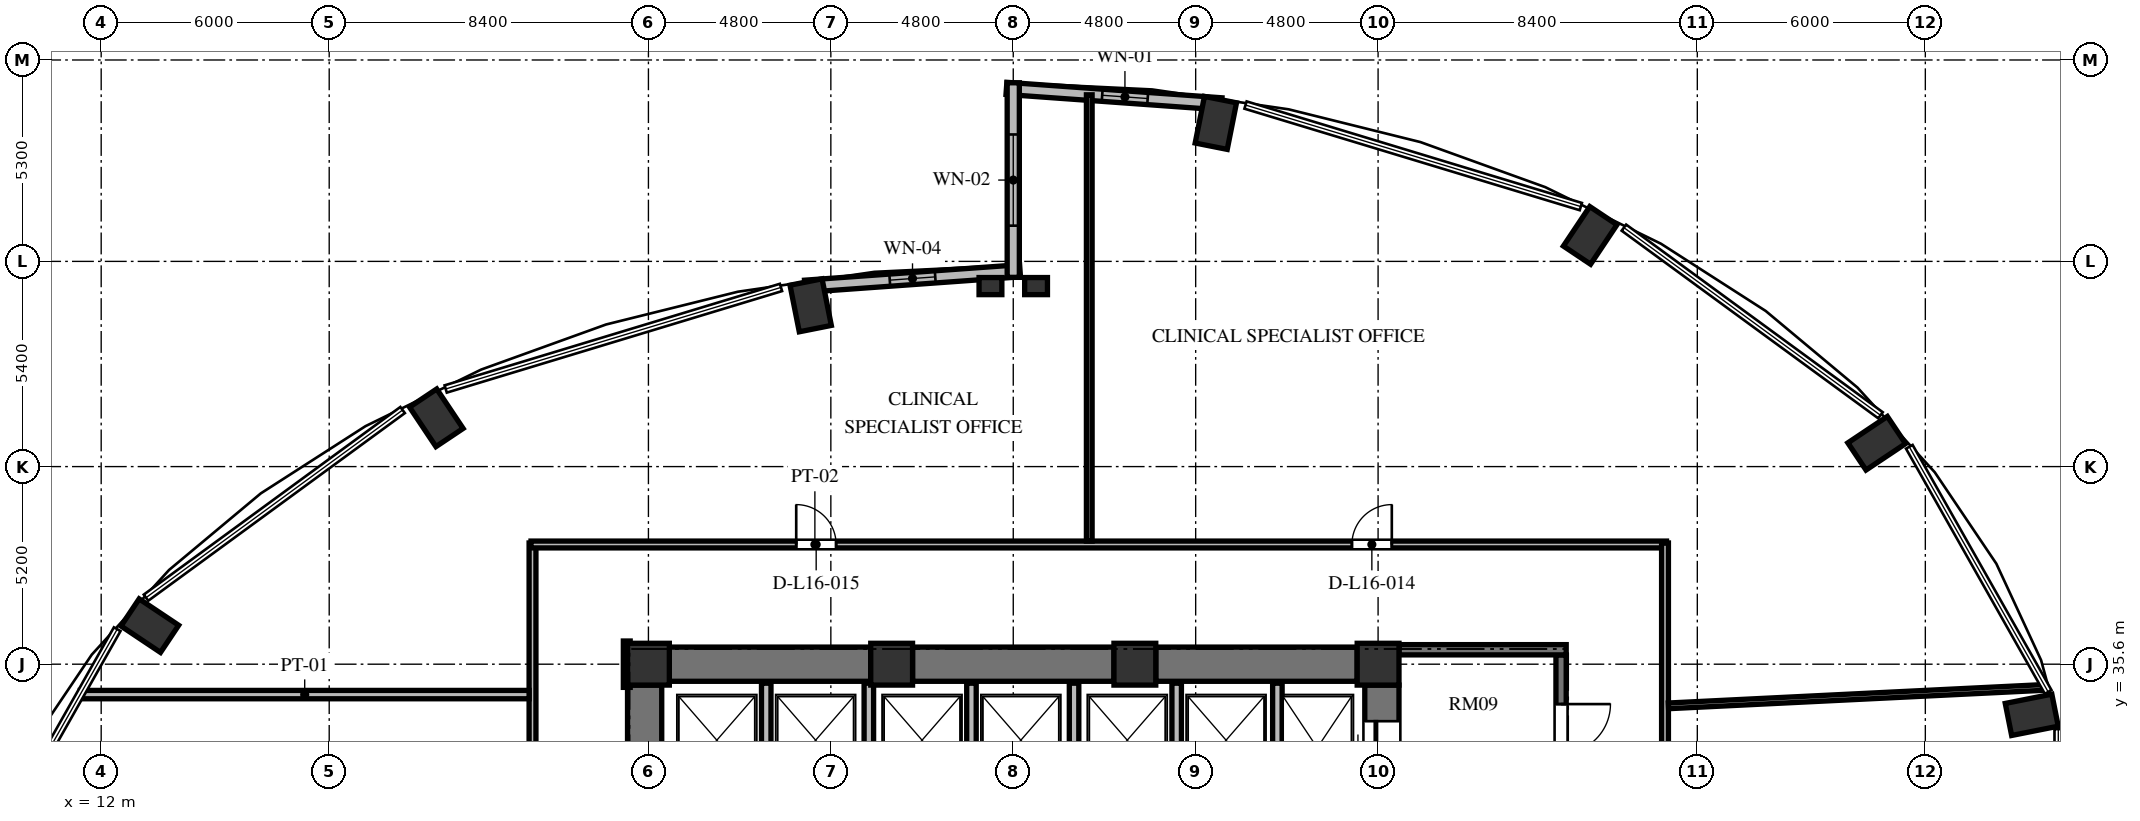
"""IFC4 building model, lengths in metres.
Left out: names, types, materials, properties, quantities, classifications, styles, units other than length and angle.
Written with IfcOpenShell. Run it as: python <this file> out.ifc"""

import sys

from ifc_helpers import new_model, si_unit, direction, frame, frame_2d, origin, origin_2d, place, context, subcontext, project, spatial, rectangle, extrude, element, fill, save


model = new_model("IFC4")
c1 = context("Model", 3, precision=1e-05, world=origin(), true_north=direction((0.0, 1.0)))
c2 = subcontext(c1, "Body", "Model", "MODEL_VIEW")
j1 = project(units=[si_unit("LENGTHUNIT", "METRE"), si_unit("PLANEANGLEUNIT", "RADIAN")], contexts=[c1])
p1 = place(None, origin())
s1 = spatial("IfcSite", under=j1, at=p1, CompositionType="ELEMENT")
p2 = place(p1, origin())
s2 = spatial("IfcBuilding", under=s1, at=p2, CompositionType="ELEMENT")
p3 = place(p2, frame((0.0, 0.0, 65.328)))
s3 = spatial("IfcBuildingStorey", under=s2, at=p3, CompositionType="ELEMENT", Elevation=65.328)
for number, where, z_axis, x_axis in (
    (1, (62.8, 34.268, 0.0), (0.0, 0.0, 1.0), (0.981, 0.195, 0.0)),
    (2, (58.72, 41.414, 0.0), (0.0, 0.0, 1.0), (0.831, 0.556, 0.0)),
    (3, (51.181, 46.884, 0.0), (0.0, 0.0, 1.0), (0.556, 0.831, 0.0)),
    (4, (41.331, 49.844, 0.0), (0.0, 0.0, 1.0), (0.195, 0.981, 0.0)),
    (5, (30.669, 45.044, 0.0), (0.0, 0.0, 1.0), (-0.195, 0.981, 0.0)),
    (6, (20.819, 42.084, 0.0), (0.0, 0.0, 1.0), (-0.556, 0.831, 0.0)),
    (7, (13.28, 36.614, 0.0), (0.0, 0.0, 1.0), (-0.831, 0.556, 0.0)),
):
    element("IfcColumn", number, at=place(p3, frame(where, z_axis=z_axis, x_axis=x_axis)), inside=s3, PredefinedType="COLUMN", context=c2, shape_type="SweptSolid", body=[
        extrude(rectangle(XDim=1.25, YDim=0.86, at=origin_2d()), origin(), (0.0, 0.0, 1.0), 3.648),
    ])
for number, where, z_axis, x_axis in (
    (8, (45.6, 35.6, 0.0), (0.0, 0.0, 1.0), (1.0, 0.0, 0.0)),
    (9, (39.2, 35.6, 0.0), (0.0, 0.0, 1.0), (1.0, 0.0, 0.0)),
    (10, (32.8, 35.6, 0.0), (0.0, 0.0, 1.0), (1.0, 0.0, 0.0)),
    (11, (26.4, 35.6, 0.0), (0.0, 0.0, 1.0), (1.0, 0.0, 0.0)),
):
    element("IfcColumn", number, at=place(p3, frame(where, z_axis=z_axis, x_axis=x_axis)), inside=s3, PredefinedType="COLUMN", context=c2, shape_type="SweptSolid", body=[
        extrude(rectangle(XDim=1.1, YDim=1.1, at=origin_2d()), origin(), (0.0, 0.0, 1.0), 3.648),
    ])
for number, where, z_axis, x_axis in (
    (12, (35.4, 45.55, 0.0), (0.0, 0.0, 1.0), (1.0, 0.0, 0.0)),
    (13, (36.6, 45.55, 0.0), (0.0, 0.0, 1.0), (1.0, 0.0, 0.0)),
):
    element("IfcColumn", number, at=place(p3, frame(where, z_axis=z_axis, x_axis=x_axis)), inside=s3, PredefinedType="PILASTER", context=c2, shape_type="SweptSolid", body=[
        extrude(rectangle(XDim=0.6, YDim=0.45, at=origin_2d()), origin(), (0.0, 0.0, 1.0), 3.648),
    ])
p4 = place(p3, frame((26.3, 20.95, 0.0), z_axis=(0.0, 0.0, 1.0), x_axis=(0.0, 1.0, 0.0)))
e14 = element("IfcWall", 14, at=p4, inside=s3, PredefinedType="SHEAR", context=c2, shape_type="SweptSolid", body=[
    extrude(rectangle(XDim=14.1, YDim=0.9, at=frame_2d((7.05, 0.0))), origin(), (0.0, 0.0, 1.0), 3.648),
])
p5 = place(p4, frame((6.5, 0.0, 0.0)))
e15 = element("IfcOpeningElement", 15, at=p5, cuts=e14, PredefinedType="OPENING", context=c2, shape_type="SweptSolid", body=[
    extrude(rectangle(XDim=1.2, YDim=2.15, at=frame_2d((0.6, 1.075))), frame((0.0, 0.46, 0.0), z_axis=(0.0, -1.0, 0.0), x_axis=(1.0, 0.0, 0.0)), (0.0, 0.0, 1.0), 0.92),
])
p6 = place(p4, frame((9.6, 0.0, 0.0)))
e16 = element("IfcOpeningElement", 16, at=p6, cuts=e14, PredefinedType="OPENING", context=c2, shape_type="SweptSolid", body=[
    extrude(rectangle(XDim=1.3, YDim=2.2, at=frame_2d((0.65, 1.1))), frame((0.0, 0.46, 0.0), z_axis=(0.0, -1.0, 0.0), x_axis=(1.0, 0.0, 0.0)), (0.0, 0.0, 1.0), 0.92),
])
p7 = place(p4, frame((3.26, 0.0, 0.0)))
e17 = element("IfcOpeningElement", 17, at=p7, cuts=e14, PredefinedType="OPENING", context=c2, shape_type="SweptSolid", body=[
    extrude(rectangle(XDim=1.3, YDim=2.2, at=frame_2d((0.65, 1.1))), frame((0.0, 0.46, 0.0), z_axis=(0.0, -1.0, 0.0), x_axis=(1.0, 0.0, 0.0)), (0.0, 0.0, 1.0), 0.92),
])
p8 = place(p3, frame((45.7, 20.95, 0.0), z_axis=(0.0, 0.0, 1.0), x_axis=(0.0, 1.0, 0.0)))
e18 = element("IfcWall", 18, at=p8, inside=s3, PredefinedType="SHEAR", context=c2, shape_type="SweptSolid", body=[
    extrude(rectangle(XDim=14.1, YDim=0.9, at=frame_2d((7.05, 0.0))), origin(), (0.0, 0.0, 1.0), 3.648),
])
p9 = place(p8, frame((11.75, 0.0, 0.0)))
e19 = element("IfcOpeningElement", 19, at=p9, cuts=e18, PredefinedType="OPENING", context=c2, shape_type="SweptSolid", body=[
    extrude(rectangle(XDim=1.4, YDim=2.3, at=frame_2d((0.7, 1.15))), frame((0.0, 0.46, 0.0), z_axis=(0.0, -1.0, 0.0), x_axis=(1.0, 0.0, 0.0)), (0.0, 0.0, 1.0), 0.92),
])
p10 = place(p8, frame((0.95, 0.0, 0.0)))
e20 = element("IfcOpeningElement", 20, at=p10, cuts=e18, PredefinedType="OPENING", context=c2, shape_type="SweptSolid", body=[
    extrude(rectangle(XDim=1.4, YDim=2.3, at=frame_2d((0.7, 1.15))), frame((0.0, 0.46, 0.0), z_axis=(0.0, -1.0, 0.0), x_axis=(1.0, 0.0, 0.0)), (0.0, 0.0, 1.0), 0.92),
])
p11 = place(p3, frame((26.95, 35.6, 0.0), z_axis=(0.0, 0.0, 1.0), x_axis=(1.0, 0.0, 0.0)))
e21 = element("IfcWall", 21, at=p11, inside=s3, PredefinedType="SHEAR", context=c2, shape_type="SweptSolid", body=[
    extrude(rectangle(XDim=5.3, YDim=0.9, at=frame_2d((2.65, 0.0))), origin(), (0.0, 0.0, 1.0), 3.648),
])
p12 = place(p3, frame((33.35, 35.6, 0.0), z_axis=(0.0, 0.0, 1.0), x_axis=(1.0, 0.0, 0.0)))
e22 = element("IfcWall", 22, at=p12, inside=s3, PredefinedType="SHEAR", context=c2, shape_type="SweptSolid", body=[
    extrude(rectangle(XDim=5.3, YDim=0.9, at=frame_2d((2.65, 0.0))), origin(), (0.0, 0.0, 1.0), 3.648),
])
p13 = place(p3, frame((39.75, 35.6, 0.0), z_axis=(0.0, 0.0, 1.0), x_axis=(1.0, 0.0, 0.0)))
e23 = element("IfcWall", 23, at=p13, inside=s3, PredefinedType="SHEAR", context=c2, shape_type="SweptSolid", body=[
    extrude(rectangle(XDim=5.3, YDim=0.9, at=frame_2d((2.65, 0.0))), origin(), (0.0, 0.0, 1.0), 3.648),
])
p14 = place(p3, frame((41.481, 50.346, 0.0), z_axis=(0.0, 0.0, 1.0), x_axis=(-0.997422321809, 0.071754525696, 0.0)))
e24 = element("IfcWall", 24, at=p14, inside=s3, PredefinedType="SOLIDWALL", context=c2, shape_type="SweptSolid", body=[
    extrude(rectangle(XDim=5.675, YDim=0.32, at=frame_2d((2.838, 0.0))), origin(), (0.0, 0.0, 1.0), 3.428),
])
p15 = place(p14, frame((1.949, 0.0, 0.85)))
e25 = element("IfcOpeningElement", 25, at=p15, cuts=e24, PredefinedType="OPENING", context=c2, shape_type="SweptSolid", body=[
    extrude(rectangle(XDim=1.2, YDim=2.2, at=frame_2d((0.6, 1.1))), frame((0.0, 0.17, 0.0), z_axis=(0.0, -1.0, 0.0), x_axis=(1.0, 0.0, 0.0)), (0.0, 0.0, 1.0), 0.34),
])
p16 = place(p3, frame((36.179, 45.953, 0.0), z_axis=(0.0, 0.0, 1.0), x_axis=(-0.997421878774, -0.071760683825, 0.0)))
e26 = element("IfcWall", 26, at=p16, inside=s3, PredefinedType="SOLIDWALL", context=c2, shape_type="SweptSolid", body=[
    extrude(rectangle(XDim=5.675, YDim=0.32, at=frame_2d((2.837, 0.0))), origin(), (0.0, 0.0, 1.0), 3.428),
])
p17 = place(p16, frame((2.237, 0.0, 0.85)))
e27 = element("IfcOpeningElement", 27, at=p17, cuts=e26, PredefinedType="OPENING", context=c2, shape_type="SweptSolid", body=[
    extrude(rectangle(XDim=1.2, YDim=1.8, at=frame_2d((0.6, 0.9))), frame((0.0, 0.17, 0.0), z_axis=(0.0, -1.0, 0.0), x_axis=(1.0, 0.0, 0.0)), (0.0, 0.0, 1.0), 0.34),
])
p18 = place(p3, frame((36.0, 50.9, 0.0), z_axis=(0.0, 0.0, 1.0), x_axis=(0.0, -1.0, 0.0)))
e28 = element("IfcWall", 28, at=p18, inside=s3, PredefinedType="SOLIDWALL", context=c2, shape_type="SweptSolid", body=[
    extrude(rectangle(XDim=5.12, YDim=0.32, at=frame_2d((2.56, 0.0))), origin(), (0.0, 0.0, 1.0), 3.428),
])
p19 = place(p18, frame((1.36, 0.0, 0.84)))
e29 = element("IfcOpeningElement", 29, at=p19, cuts=e28, PredefinedType="OPENING", context=c2, shape_type="SweptSolid", body=[
    extrude(rectangle(XDim=2.4, YDim=2.04, at=frame_2d((1.2, 1.02))), frame((0.0, 0.17, 0.0), z_axis=(0.0, -1.0, 0.0), x_axis=(1.0, 0.0, 0.0)), (0.0, 0.0, 1.0), 0.34),
])
p20 = place(p3, frame((42.95, 31.92, 0.0), z_axis=(0.0, 0.0, 1.0), x_axis=(0.0, 1.0, 0.0)))
e30 = element("IfcWall", 30, at=p20, inside=s3, PredefinedType="SOLIDWALL", context=c2, shape_type="SweptSolid", body=[
    extrude(rectangle(XDim=3.18, YDim=0.25, at=frame_2d((1.59, 0.0))), origin(), (0.0, 0.0, 1.0), 3.428),
])
for number, where, z_axis, x_axis in (
    (31, (29.5, 32.42, 0.0), (0.0, 0.0, 1.0), (0.0, 1.0, 0.0)),
    (32, (32.2, 32.42, 0.0), (0.0, 0.0, 1.0), (0.0, 1.0, 0.0)),
    (33, (34.9, 32.42, 0.0), (0.0, 0.0, 1.0), (0.0, 1.0, 0.0)),
    (34, (37.6, 32.42, 0.0), (0.0, 0.0, 1.0), (0.0, 1.0, 0.0)),
    (35, (40.3, 32.42, 0.0), (0.0, 0.0, 1.0), (0.0, 1.0, 0.0)),
):
    element("IfcWall", number, at=place(p3, frame(where, z_axis=z_axis, x_axis=x_axis)), inside=s3, PredefinedType="SOLIDWALL", context=c2, shape_type="SweptSolid", body=[
        extrude(rectangle(XDim=2.68, YDim=0.25, at=frame_2d((1.34, 0.0))), origin(), (0.0, 0.0, 1.0), 3.428),
    ])
p21 = place(p3, frame((50.415, 35.845, 0.0), z_axis=(0.0, 0.0, 1.0), x_axis=(0.0, -1.0, 0.0)))
e36 = element("IfcWall", 36, at=p21, inside=s3, PredefinedType="SHEAR", context=c2, shape_type="SweptSolid", body=[
    extrude(rectangle(XDim=15.825, YDim=0.27, at=frame_2d((7.913, 0.0))), origin(), (0.0, 0.0, 1.0), 3.648),
])
p22 = place(p21, frame((4.445, 0.0, 0.0)))
e37 = element("IfcOpeningElement", 37, at=p22, cuts=e36, PredefinedType="OPENING", context=c2, shape_type="SweptSolid", body=[
    extrude(rectangle(XDim=1.2, YDim=2.15, at=frame_2d((0.6, 1.075))), frame((0.0, 0.145, 0.0), z_axis=(0.0, -1.0, 0.0), x_axis=(1.0, 0.0, 0.0)), (0.0, 0.0, 1.0), 0.29),
])
p23 = place(p21, frame((1.295, 0.0, 0.0)))
e38 = element("IfcOpeningElement", 38, at=p23, cuts=e36, PredefinedType="OPENING", context=c2, shape_type="SweptSolid", body=[
    extrude(rectangle(XDim=1.3, YDim=2.2, at=frame_2d((0.65, 1.1))), frame((0.0, 0.145, 0.0), z_axis=(0.0, -1.0, 0.0), x_axis=(1.0, 0.0, 0.0)), (0.0, 0.0, 1.0), 0.29),
])
p24 = place(p21, frame((13.095, 0.0, 0.0)))
e39 = element("IfcOpeningElement", 39, at=p24, cuts=e36, PredefinedType="OPENING", context=c2, shape_type="SweptSolid", body=[
    extrude(rectangle(XDim=1.3, YDim=2.2, at=frame_2d((0.65, 1.1))), frame((0.0, 0.145, 0.0), z_axis=(0.0, -1.0, 0.0), x_axis=(1.0, 0.0, 0.0)), (0.0, 0.0, 1.0), 0.29),
])
p25 = place(p3, frame((46.15, 35.98, 0.0), z_axis=(0.0, 0.0, 1.0), x_axis=(1.0, 0.0, 0.0)))
e40 = element("IfcWall", 40, at=p25, inside=s3, PredefinedType="SHEAR", context=c2, shape_type="SweptSolid", body=[
    extrude(rectangle(XDim=4.4, YDim=0.27, at=frame_2d((2.2, 0.0))), origin(), (0.0, 0.0, 1.0), 3.648),
])
p26 = place(p3, frame((23.35, 29.36, 0.0), z_axis=(0.0, 0.0, 1.0), x_axis=(0.0, 1.0, 0.0)))
e41 = element("IfcWall", 41, at=p26, inside=s3, PredefinedType="PARTITIONING", context=c2, shape_type="SweptSolid", body=[
    extrude(rectangle(XDim=9.43, YDim=0.18, at=frame_2d((4.715, 0.0))), origin(), (0.0, 0.0, 1.0), 3.428),
])
p27 = place(p3, frame((23.31, 38.75, 0.0), z_axis=(0.0, 0.0, 1.0), x_axis=(1.0, 0.0, 0.0)))
e42 = element("IfcWall", 42, at=p27, inside=s3, PredefinedType="PARTITIONING", context=c2, shape_type="SweptSolid", body=[
    extrude(rectangle(XDim=29.88, YDim=0.18, at=frame_2d((14.94, 0.0))), origin(), (0.0, 0.0, 1.0), 3.053),
])
p28 = place(p27, frame((21.601, 0.0, 0.0)))
e43 = element("IfcOpeningElement", 43, at=p28, cuts=e42, PredefinedType="OPENING", context=c2, shape_type="SweptSolid", body=[
    extrude(rectangle(XDim=1.05, YDim=2.15, at=frame_2d((0.525, 1.075))), frame((0.0, 0.1, 0.0), z_axis=(0.0, -1.0, 0.0), x_axis=(1.0, 0.0, 0.0)), (0.0, 0.0, 1.0), 0.2),
])
p29 = place(p27, frame((6.979, 0.0, 0.0)))
e44 = element("IfcOpeningElement", 44, at=p29, cuts=e42, PredefinedType="OPENING", context=c2, shape_type="SweptSolid", body=[
    extrude(rectangle(XDim=1.05, YDim=2.15, at=frame_2d((0.525, 1.075))), frame((0.0, 0.1, 0.0), z_axis=(0.0, -1.0, 0.0), x_axis=(1.0, 0.0, 0.0)), (0.0, 0.0, 1.0), 0.2),
])
p30 = place(p3, frame((53.15, 38.79, 0.0), z_axis=(0.0, 0.0, 1.0), x_axis=(0.0, -1.0, 0.0)))
e45 = element("IfcWall", 45, at=p30, inside=s3, PredefinedType="PARTITIONING", context=c2, shape_type="SweptSolid", body=[
    extrude(rectangle(XDim=9.43, YDim=0.18, at=frame_2d((4.715, 0.0))), origin(), (0.0, 0.0, 1.0), 3.428),
])
p31 = place(p3, frame((25.83, 36.21, 0.0), z_axis=(0.0, 0.0, 1.0), x_axis=(0.0, -1.0, 0.0)))
e46 = element("IfcWall", 46, at=p31, inside=s3, PredefinedType="PARTITIONING", context=c2, shape_type="SweptSolid", body=[
    extrude(rectangle(XDim=1.22, YDim=0.18, at=frame_2d((0.61, 0.0))), origin(), (0.0, 0.0, 1.0), 3.428),
])
p32 = place(p3, frame((11.451, 34.8, 0.0), z_axis=(0.0, 0.0, 1.0), x_axis=(1.0, 0.0, 0.0)))
e47 = element("IfcWall", 47, at=p32, inside=s3, PredefinedType="PARTITIONING", context=c2, shape_type="SweptSolid", body=[
    extrude(rectangle(XDim=11.809, YDim=0.22, at=frame_2d((5.905, 0.0))), origin(), (0.0, 0.0, 1.0), 3.428),
])
p33 = place(p3, frame((53.24, 34.504, 0.0), z_axis=(0.0, 0.0, 1.0), x_axis=(0.998798003682, 0.049015791742, 0.0)))
e48 = element("IfcWall", 48, at=p33, inside=s3, PredefinedType="PARTITIONING", context=c2, shape_type="SweptSolid", body=[
    extrude(rectangle(XDim=9.947, YDim=0.15, at=frame_2d((4.973, 0.0))), origin(), (0.0, 0.0, 1.0), 2.813),
])
p34 = place(p3, frame((38.0, 38.84, 0.0), z_axis=(0.0, 0.0, 1.0), x_axis=(0.0, 1.0, 0.0)))
e49 = element("IfcWall", 49, at=p34, inside=s3, PredefinedType="PARTITIONING", context=c2, shape_type="SweptSolid", body=[
    extrude(rectangle(XDim=11.743, YDim=0.15, at=frame_2d((5.872, 0.0))), origin(), (0.0, 0.0, 1.0), 3.428),
])
p35 = place(p15, origin())
e50 = element("IfcWindow", 50, at=p35, inside=s3, PartitioningType="SINGLE_PANEL", PredefinedType="WINDOW", context=c2, shape_type="SweptSolid", body=[
    extrude(rectangle(XDim=1.2, YDim=2.2, at=frame_2d((0.6, 1.1))), frame((0.0, 0.03, 0.0), z_axis=(0.0, -1.0, 0.0), x_axis=(1.0, 0.0, 0.0)), (0.0, 0.0, 1.0), 0.06),
])
fill(e25, e50)
p36 = place(p17, origin())
e51 = element("IfcWindow", 51, at=p36, inside=s3, PartitioningType="SINGLE_PANEL", PredefinedType="WINDOW", context=c2, shape_type="SweptSolid", body=[
    extrude(rectangle(XDim=1.2, YDim=1.8, at=frame_2d((0.6, 0.9))), frame((0.0, 0.03, 0.0), z_axis=(0.0, -1.0, 0.0), x_axis=(1.0, 0.0, 0.0)), (0.0, 0.0, 1.0), 0.06),
])
fill(e27, e51)
p37 = place(p19, origin())
e52 = element("IfcWindow", 52, at=p37, inside=s3, PartitioningType="SINGLE_PANEL", PredefinedType="WINDOW", context=c2, shape_type="SweptSolid", body=[
    extrude(rectangle(XDim=2.4, YDim=2.04, at=frame_2d((1.2, 1.02))), frame((0.0, 0.03, 0.0), z_axis=(0.0, -1.0, 0.0), x_axis=(1.0, 0.0, 0.0)), (0.0, 0.0, 1.0), 0.06),
])
fill(e29, e52)
p38 = place(p9, origin())
e53 = element("IfcDoor", 53, at=p38, inside=s3, OperationType="SLIDING_TO_LEFT", PredefinedType="DOOR", context=c2, shape_type="SweptSolid", body=[
    extrude(rectangle(XDim=1.4, YDim=2.3, at=frame_2d((0.7, 1.15))), frame((0.0, 0.025, 0.0), z_axis=(0.0, -1.0, 0.0), x_axis=(1.0, 0.0, 0.0)), (0.0, 0.0, 1.0), 0.05),
])
fill(e19, e53)
p39 = place(p23, origin())
e54 = element("IfcDoor", 54, at=p39, inside=s3, OperationType="SINGLE_SWING_LEFT", PredefinedType="DOOR", context=c2, shape_type="SweptSolid", body=[
    extrude(rectangle(XDim=1.3, YDim=2.2, at=frame_2d((0.65, 1.1))), frame((0.0, 0.025, 0.0), z_axis=(0.0, -1.0, 0.0), x_axis=(1.0, 0.0, 0.0)), (0.0, 0.0, 1.0), 0.05),
])
fill(e38, e54)
p40 = place(p28, origin())
e55 = element("IfcDoor", 55, at=p40, inside=s3, OperationType="SINGLE_SWING_RIGHT", PredefinedType="DOOR", context=c2, shape_type="SweptSolid", body=[
    extrude(rectangle(XDim=1.05, YDim=2.15, at=frame_2d((0.525, 1.075))), frame((0.0, 0.025, 0.0), z_axis=(0.0, -1.0, 0.0), x_axis=(1.0, 0.0, 0.0)), (0.0, 0.0, 1.0), 0.05),
])
fill(e43, e55)
p41 = place(p29, origin())
e56 = element("IfcDoor", 56, at=p41, inside=s3, OperationType="SINGLE_SWING_LEFT", PredefinedType="DOOR", context=c2, shape_type="SweptSolid", body=[
    extrude(rectangle(XDim=1.05, YDim=2.15, at=frame_2d((0.525, 1.075))), frame((0.0, 0.025, 0.0), z_axis=(0.0, -1.0, 0.0), x_axis=(1.0, 0.0, 0.0)), (0.0, 0.0, 1.0), 0.05),
])
fill(e44, e56)
save(model, sys.argv[1])
